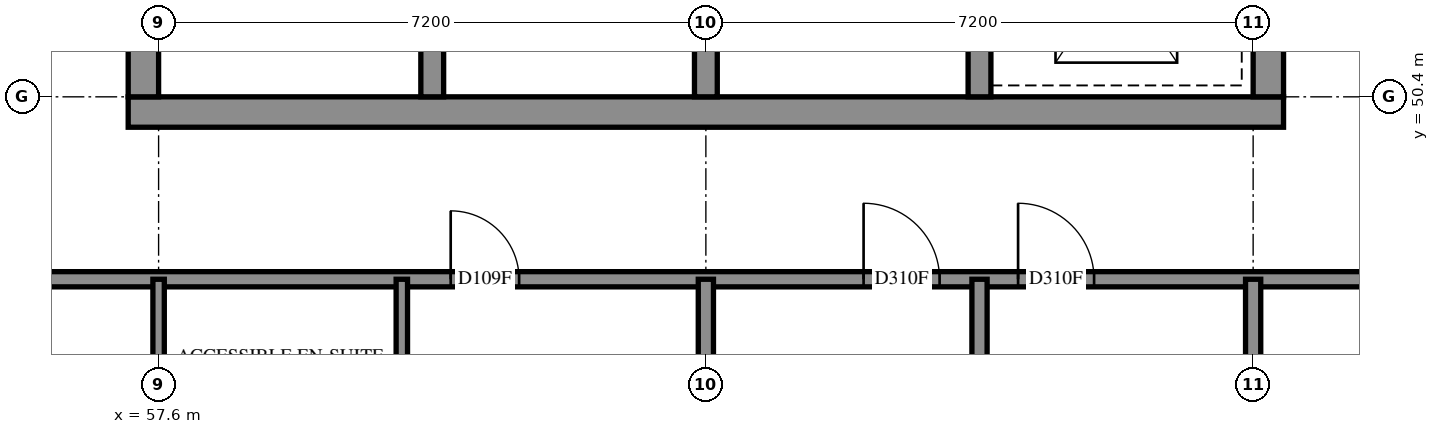
"""IFC4 building model, lengths in metres.
Left out: names, types, materials, properties, quantities, classifications, styles, units other than length and angle.
Written with IfcOpenShell. Run it as: python <this file> out.ifc"""

import sys

from ifc_helpers import new_model, si_unit, direction, frame, frame_2d, origin, place, context, subcontext, project, spatial, rectangle, extrude, element, fill, save


model = new_model("IFC4")
c1 = context("Model", 3, precision=1e-05, world=origin(), true_north=direction((0.0, 1.0)))
c2 = subcontext(c1, "Body", "Model", "MODEL_VIEW")
j1 = project(units=[si_unit("LENGTHUNIT", "METRE"), si_unit("PLANEANGLEUNIT", "RADIAN")], contexts=[c1])
p1 = place(None, origin())
s1 = spatial("IfcSite", under=j1, at=p1, CompositionType="ELEMENT")
p2 = place(p1, origin())
s2 = spatial("IfcBuilding", under=s1, at=p2, CompositionType="ELEMENT")
p3 = place(p2, frame((0.0, 0.0, 281.2)))
s3 = spatial("IfcBuildingStorey", under=s2, at=p3, CompositionType="ELEMENT", Elevation=281.2)
p4 = place(p3, frame((57.2, 50.2, -0.3), z_axis=(0.0, 0.0, 1.0), x_axis=(1.0, 0.0, 0.0)))
e1 = element("IfcWall", 1, at=p4, inside=s3, PredefinedType="SHEAR", context=c2, shape_type="SweptSolid", body=[
    extrude(rectangle(XDim=15.2, YDim=0.4, at=frame_2d((7.6, 0.0))), origin(), (0.0, 0.0, 1.0), 2.7),
])
p5 = place(p3, frame((57.4, 50.4, -0.3), z_axis=(0.0, 0.0, 1.0), x_axis=(0.0, 1.0, 0.0)))
e2 = element("IfcWall", 2, at=p5, inside=s3, PredefinedType="SHEAR", context=c2, shape_type="SweptSolid", body=[
    extrude(rectangle(XDim=14.4, YDim=0.4, at=frame_2d((7.2, 0.0))), origin(), (0.0, 0.0, 1.0), 2.7),
])
p6 = place(p5, frame((4.55, 0.0, 0.3)))
e3 = element("IfcOpeningElement", 3, at=p6, cuts=e2, PredefinedType="OPENING", context=c2, shape_type="SweptSolid", body=[
    extrude(rectangle(XDim=1.1, YDim=2.1, at=frame_2d((0.55, 1.05))), frame((0.0, 0.21, 0.0), z_axis=(0.0, -1.0, 0.0), x_axis=(1.0, 0.0, 0.0)), (0.0, 0.0, 1.0), 0.42),
])
p7 = place(p5, frame((11.35, 0.0, 0.3)))
e4 = element("IfcOpeningElement", 4, at=p7, cuts=e2, PredefinedType="OPENING", context=c2, shape_type="SweptSolid", body=[
    extrude(rectangle(XDim=1.1, YDim=2.1, at=frame_2d((0.55, 1.05))), frame((0.0, 0.21, 0.0), z_axis=(0.0, -1.0, 0.0), x_axis=(1.0, 0.0, 0.0)), (0.0, 0.0, 1.0), 0.42),
])
p8 = place(p3, frame((72.2, 50.4, -0.3), z_axis=(0.0, 0.0, 1.0), x_axis=(0.0, 1.0, 0.0)))
e5 = element("IfcWall", 5, at=p8, inside=s3, PredefinedType="SHEAR", context=c2, shape_type="SweptSolid", body=[
    extrude(rectangle(XDim=14.4, YDim=0.4, at=frame_2d((7.2, 0.0))), origin(), (0.0, 0.0, 1.0), 2.7),
])
p9 = place(p8, frame((4.55, 0.0, 0.3)))
e6 = element("IfcOpeningElement", 6, at=p9, cuts=e5, PredefinedType="OPENING", context=c2, shape_type="SweptSolid", body=[
    extrude(rectangle(XDim=1.1, YDim=2.1, at=frame_2d((0.55, 1.05))), frame((0.0, 0.21, 0.0), z_axis=(0.0, -1.0, 0.0), x_axis=(1.0, 0.0, 0.0)), (0.0, 0.0, 1.0), 0.42),
])
p10 = place(p8, frame((11.35, 0.0, 0.3)))
e7 = element("IfcOpeningElement", 7, at=p10, cuts=e5, PredefinedType="OPENING", context=c2, shape_type="SweptSolid", body=[
    extrude(rectangle(XDim=1.1, YDim=2.1, at=frame_2d((0.55, 1.05))), frame((0.0, 0.21, 0.0), z_axis=(0.0, -1.0, 0.0), x_axis=(1.0, 0.0, 0.0)), (0.0, 0.0, 1.0), 0.42),
])
for number, where, z_axis, x_axis in (
    (8, (61.2, 50.4, 0.0), (0.0, 0.0, 1.0), (0.0, 1.0, 0.0)),
    (9, (64.8, 50.4, 0.0), (0.0, 0.0, 1.0), (0.0, 1.0, 0.0)),
    (10, (68.4, 50.4, 0.0), (0.0, 0.0, 1.0), (0.0, 1.0, 0.0)),
):
    element("IfcWall", number, at=place(p3, frame(where, z_axis=z_axis, x_axis=x_axis)), inside=s3, PredefinedType="SOLIDWALL", context=c2, shape_type="SweptSolid", body=[
        extrude(rectangle(XDim=3.3, YDim=0.3, at=frame_2d((1.65, 0.0))), origin(), (0.0, 0.0, 1.0), 3.1),
    ])
p11 = place(p3, frame((55.2, 48.0, 0.0), z_axis=(0.0, 0.0, 1.0), x_axis=(1.0, 0.0, 0.0)))
e11 = element("IfcWall", 11, at=p11, inside=s3, PredefinedType="PARTITIONING", context=c2, shape_type="SweptSolid", body=[
    extrude(rectangle(XDim=19.15, YDim=0.2, at=frame_2d((9.575, 0.0))), origin(), (0.0, 0.0, 1.0), 3.1),
])
p12 = place(p11, frame((6.243, 0.0, 0.0)))
e12 = element("IfcOpeningElement", 12, at=p12, cuts=e11, PredefinedType="OPENING", context=c2, shape_type="SweptSolid", body=[
    extrude(rectangle(XDim=0.9, YDim=2.1, at=frame_2d((0.45, 1.05))), frame((0.0, 0.11, 0.0), z_axis=(0.0, -1.0, 0.0), x_axis=(1.0, 0.0, 0.0)), (0.0, 0.0, 1.0), 0.22),
])
p13 = place(p11, frame((11.675, 0.0, 0.0)))
e13 = element("IfcOpeningElement", 13, at=p13, cuts=e11, PredefinedType="OPENING", context=c2, shape_type="SweptSolid", body=[
    extrude(rectangle(XDim=1.0, YDim=2.1, at=frame_2d((0.5, 1.05))), frame((0.0, 0.11, 0.0), z_axis=(0.0, -1.0, 0.0), x_axis=(1.0, 0.0, 0.0)), (0.0, 0.0, 1.0), 0.22),
])
p14 = place(p11, frame((13.707, 0.0, 0.0)))
e14 = element("IfcOpeningElement", 14, at=p14, cuts=e11, PredefinedType="OPENING", context=c2, shape_type="SweptSolid", body=[
    extrude(rectangle(XDim=1.0, YDim=2.1, at=frame_2d((0.5, 1.05))), frame((0.0, 0.11, 0.0), z_axis=(0.0, -1.0, 0.0), x_axis=(1.0, 0.0, 0.0)), (0.0, 0.0, 1.0), 0.22),
])
p15 = place(p3, frame((68.4, 42.268, 0.0), z_axis=(0.0, 0.0, 1.0), x_axis=(0.0, 1.0, 0.0)))
e15 = element("IfcWall", 15, at=p15, inside=s3, PredefinedType="PARTITIONING", context=c2, shape_type="SweptSolid", body=[
    extrude(rectangle(XDim=5.732, YDim=0.2, at=frame_2d((2.866, 0.0))), origin(), (0.0, 0.0, 1.0), 3.1),
])
for number, where, z_axis, x_axis in (
    (16, (64.8, 43.55, 0.0), (0.0, 0.0, 1.0), (0.0, 1.0, 0.0)),
    (17, (72.0, 43.55, 0.0), (0.0, 0.0, 1.0), (0.0, 1.0, 0.0)),
):
    element("IfcWall", number, at=place(p3, frame(where, z_axis=z_axis, x_axis=x_axis)), inside=s3, PredefinedType="PARTITIONING", context=c2, shape_type="SweptSolid", body=[
        extrude(rectangle(XDim=4.45, YDim=0.2, at=frame_2d((2.225, 0.0))), origin(), (0.0, 0.0, 1.0), 3.1),
    ])
for number, where, z_axis, x_axis in (
    (18, (60.8, 45.6, 0.0), (0.0, 0.0, 1.0), (0.0, 1.0, 0.0)),
    (19, (57.6, 45.6, 0.0), (0.0, 0.0, 1.0), (0.0, 1.0, 0.0)),
):
    element("IfcWall", number, at=place(p3, frame(where, z_axis=z_axis, x_axis=x_axis)), inside=s3, PredefinedType="PARTITIONING", context=c2, shape_type="SweptSolid", body=[
        extrude(rectangle(XDim=2.4, YDim=0.15, at=frame_2d((1.2, 0.0))), origin(), (0.0, 0.0, 1.0), 3.1),
    ])
p16 = place(p12, origin())
e20 = element("IfcDoor", 20, at=p16, inside=s3, OperationType="SINGLE_SWING_LEFT", PredefinedType="DOOR", context=c2, shape_type="SweptSolid", body=[
    extrude(rectangle(XDim=0.9, YDim=2.1, at=frame_2d((0.45, 1.05))), frame((0.0, 0.025, 0.0), z_axis=(0.0, -1.0, 0.0), x_axis=(1.0, 0.0, 0.0)), (0.0, 0.0, 1.0), 0.05),
])
fill(e12, e20)
p17 = place(p13, origin())
e21 = element("IfcDoor", 21, at=p17, inside=s3, OperationType="SINGLE_SWING_LEFT", PredefinedType="DOOR", context=c2, shape_type="SweptSolid", body=[
    extrude(rectangle(XDim=1.0, YDim=2.1, at=frame_2d((0.5, 1.05))), frame((0.0, 0.025, 0.0), z_axis=(0.0, -1.0, 0.0), x_axis=(1.0, 0.0, 0.0)), (0.0, 0.0, 1.0), 0.05),
])
fill(e13, e21)
p18 = place(p14, origin())
e22 = element("IfcDoor", 22, at=p18, inside=s3, OperationType="SINGLE_SWING_RIGHT", PredefinedType="DOOR", context=c2, shape_type="SweptSolid", body=[
    extrude(rectangle(XDim=1.0, YDim=2.1, at=frame_2d((0.5, 1.05))), frame((0.0, 0.025, 0.0), z_axis=(0.0, -1.0, 0.0), x_axis=(1.0, 0.0, 0.0)), (0.0, 0.0, 1.0), 0.05),
])
fill(e14, e22)
save(model, sys.argv[1])
